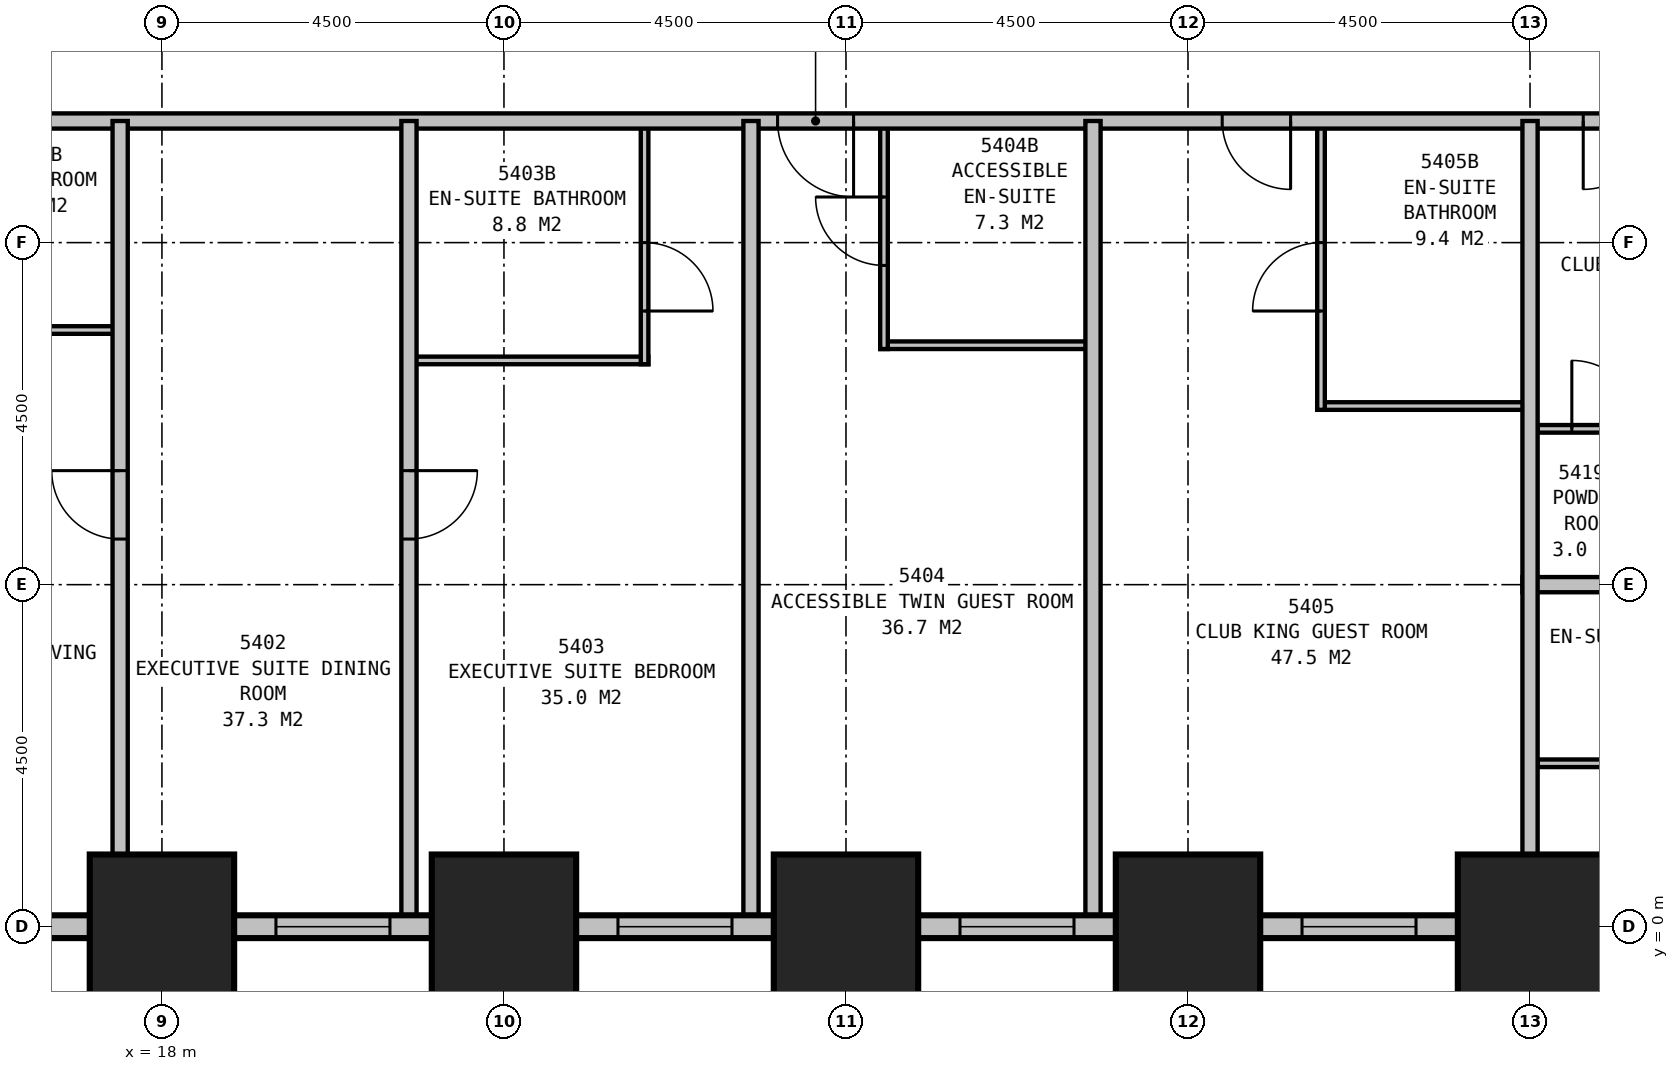
"""IFC4 building model, lengths in metres.
Left out: names, types, materials, properties, quantities, classifications, styles, units other than length and angle.
Written with IfcOpenShell. Run it as: python <this file> out.ifc"""

import sys

from ifc_helpers import new_model, si_unit, direction, frame, frame_2d, origin, origin_2d, place, context, subcontext, project, spatial, rectangle, extrude, element, fill, save


model = new_model("IFC4")
c1 = context("Model", 3, precision=1e-05, world=origin(), true_north=direction((0.0, 1.0)))
c2 = subcontext(c1, "Body", "Model", "MODEL_VIEW")
j1 = project(units=[si_unit("LENGTHUNIT", "METRE"), si_unit("PLANEANGLEUNIT", "RADIAN")], contexts=[c1])
p1 = place(None, origin())
s1 = spatial("IfcSite", under=j1, at=p1, CompositionType="ELEMENT")
p2 = place(p1, origin())
s2 = spatial("IfcBuilding", under=s1, at=p2, CompositionType="ELEMENT")
p3 = place(p2, frame((0.0, 0.0, 207.9)))
s3 = spatial("IfcBuildingStorey", under=s2, at=p3, CompositionType="ELEMENT", Elevation=207.9)
for number, where, z_axis, x_axis in (
    (1, (18.0, 0.0, 0.0), (0.0, 0.0, 1.0), (1.0, 0.0, 0.0)),
    (2, (22.5, 0.0, 0.0), (0.0, 0.0, 1.0), (1.0, 0.0, 0.0)),
    (3, (27.0, 0.0, 0.0), (0.0, 0.0, 1.0), (1.0, 0.0, 0.0)),
    (4, (31.5, 0.0, 0.0), (0.0, 0.0, 1.0), (1.0, 0.0, 0.0)),
    (5, (36.0, 0.0, 0.0), (0.0, 0.0, 1.0), (1.0, 0.0, 0.0)),
):
    element("IfcColumn", number, at=place(p3, frame(where, z_axis=z_axis, x_axis=x_axis)), inside=s3, PredefinedType="COLUMN", context=c2, shape_type="SweptSolid", body=[
        extrude(rectangle(XDim=1.9, YDim=1.9, at=origin_2d()), origin(), (0.0, 0.0, 1.0), 3.5),
    ])
p4 = place(p3, frame((8.85, 0.0, 0.0), z_axis=(0.0, 0.0, 1.0), x_axis=(1.0, 0.0, 0.0)))
e6 = element("IfcWall", 6, at=p4, inside=s3, PredefinedType="STANDARD", context=c2, shape_type="SweptSolid", body=[
    extrude(rectangle(XDim=36.3, YDim=0.3, at=frame_2d((18.15, 0.0))), origin(), (0.0, 0.0, 1.0), 1.9),
])
p5 = place(p4, frame((1.65, 0.0, 0.5)))
e7 = element("IfcOpeningElement", 7, at=p5, cuts=e6, PredefinedType="OPENING", context=c2, shape_type="SweptSolid", body=[
    extrude(rectangle(XDim=1.5, YDim=1.2, at=frame_2d((0.75, 0.6))), frame((0.0, 0.16, 0.0), z_axis=(0.0, -1.0, 0.0), x_axis=(1.0, 0.0, 0.0)), (0.0, 0.0, 1.0), 0.32),
])
p6 = place(p4, frame((6.15, 0.0, 0.5)))
e8 = element("IfcOpeningElement", 8, at=p6, cuts=e6, PredefinedType="OPENING", context=c2, shape_type="SweptSolid", body=[
    extrude(rectangle(XDim=1.5, YDim=1.2, at=frame_2d((0.75, 0.6))), frame((0.0, 0.16, 0.0), z_axis=(0.0, -1.0, 0.0), x_axis=(1.0, 0.0, 0.0)), (0.0, 0.0, 1.0), 0.32),
])
p7 = place(p4, frame((10.65, 0.0, 0.5)))
e9 = element("IfcOpeningElement", 9, at=p7, cuts=e6, PredefinedType="OPENING", context=c2, shape_type="SweptSolid", body=[
    extrude(rectangle(XDim=1.5, YDim=1.2, at=frame_2d((0.75, 0.6))), frame((0.0, 0.16, 0.0), z_axis=(0.0, -1.0, 0.0), x_axis=(1.0, 0.0, 0.0)), (0.0, 0.0, 1.0), 0.32),
])
p8 = place(p4, frame((15.15, 0.0, 0.5)))
e10 = element("IfcOpeningElement", 10, at=p8, cuts=e6, PredefinedType="OPENING", context=c2, shape_type="SweptSolid", body=[
    extrude(rectangle(XDim=1.5, YDim=1.2, at=frame_2d((0.75, 0.6))), frame((0.0, 0.16, 0.0), z_axis=(0.0, -1.0, 0.0), x_axis=(1.0, 0.0, 0.0)), (0.0, 0.0, 1.0), 0.32),
])
p9 = place(p4, frame((19.65, 0.0, 0.5)))
e11 = element("IfcOpeningElement", 11, at=p9, cuts=e6, PredefinedType="OPENING", context=c2, shape_type="SweptSolid", body=[
    extrude(rectangle(XDim=1.5, YDim=1.2, at=frame_2d((0.75, 0.6))), frame((0.0, 0.16, 0.0), z_axis=(0.0, -1.0, 0.0), x_axis=(1.0, 0.0, 0.0)), (0.0, 0.0, 1.0), 0.32),
])
p10 = place(p4, frame((24.15, 0.0, 0.5)))
e12 = element("IfcOpeningElement", 12, at=p10, cuts=e6, PredefinedType="OPENING", context=c2, shape_type="SweptSolid", body=[
    extrude(rectangle(XDim=1.5, YDim=1.2, at=frame_2d((0.75, 0.6))), frame((0.0, 0.16, 0.0), z_axis=(0.0, -1.0, 0.0), x_axis=(1.0, 0.0, 0.0)), (0.0, 0.0, 1.0), 0.32),
])
p11 = place(p4, frame((28.65, 0.0, 0.5)))
e13 = element("IfcOpeningElement", 13, at=p11, cuts=e6, PredefinedType="OPENING", context=c2, shape_type="SweptSolid", body=[
    extrude(rectangle(XDim=1.5, YDim=1.2, at=frame_2d((0.75, 0.6))), frame((0.0, 0.16, 0.0), z_axis=(0.0, -1.0, 0.0), x_axis=(1.0, 0.0, 0.0)), (0.0, 0.0, 1.0), 0.32),
])
p12 = place(p4, frame((33.15, 0.0, 0.5)))
e14 = element("IfcOpeningElement", 14, at=p12, cuts=e6, PredefinedType="OPENING", context=c2, shape_type="SweptSolid", body=[
    extrude(rectangle(XDim=1.5, YDim=1.2, at=frame_2d((0.75, 0.6))), frame((0.0, 0.16, 0.0), z_axis=(0.0, -1.0, 0.0), x_axis=(1.0, 0.0, 0.0)), (0.0, 0.0, 1.0), 0.32),
])
p13 = place(p3, frame((11.2, 10.6, 0.0), z_axis=(0.0, 0.0, 1.0), x_axis=(1.0, 0.0, 0.0)))
e15 = element("IfcWall", 15, at=p13, inside=s3, PredefinedType="PARTITIONING", context=c2, shape_type="SweptSolid", body=[
    extrude(rectangle(XDim=27.1, YDim=0.2, at=frame_2d((13.55, 0.0))), origin(), (0.0, 0.0, 1.0), 3.25),
])
p14 = place(p13, frame((3.5, 0.0, 0.0), z_axis=(0.0, 0.0, 1.0), x_axis=(-1.0, 0.0, 0.0)))
e16 = element("IfcOpeningElement", 16, at=p14, cuts=e15, PredefinedType="OPENING", context=c2, shape_type="SweptSolid", body=[
    extrude(rectangle(XDim=0.9, YDim=2.1, at=frame_2d((0.45, 1.05))), frame((0.0, 0.11, 0.0), z_axis=(0.0, -1.0, 0.0), x_axis=(1.0, 0.0, 0.0)), (0.0, 0.0, 1.0), 0.22),
])
p15 = place(p13, frame((15.9, 0.0, 0.0), z_axis=(0.0, 0.0, 1.0), x_axis=(-1.0, 0.0, 0.0)))
e17 = element("IfcOpeningElement", 17, at=p15, cuts=e15, PredefinedType="OPENING", context=c2, shape_type="SweptSolid", body=[
    extrude(rectangle(XDim=1.0, YDim=2.1, at=frame_2d((0.5, 1.05))), frame((0.0, 0.11, 0.0), z_axis=(0.0, -1.0, 0.0), x_axis=(1.0, 0.0, 0.0)), (0.0, 0.0, 1.0), 0.22),
])
p16 = place(p13, frame((21.65, 0.0, 0.0), z_axis=(0.0, 0.0, 1.0), x_axis=(-1.0, 0.0, 0.0)))
e18 = element("IfcOpeningElement", 18, at=p16, cuts=e15, PredefinedType="OPENING", context=c2, shape_type="SweptSolid", body=[
    extrude(rectangle(XDim=0.9, YDim=2.1, at=frame_2d((0.45, 1.05))), frame((0.0, 0.11, 0.0), z_axis=(0.0, -1.0, 0.0), x_axis=(1.0, 0.0, 0.0)), (0.0, 0.0, 1.0), 0.22),
])
p17 = place(p13, frame((1.6, 0.0, 0.0), z_axis=(0.0, 0.0, 1.0), x_axis=(-1.0, 0.0, 0.0)))
e19 = element("IfcOpeningElement", 19, at=p17, cuts=e15, PredefinedType="OPENING", context=c2, shape_type="SweptSolid", body=[
    extrude(rectangle(XDim=0.9, YDim=2.1, at=frame_2d((0.45, 1.05))), frame((0.0, 0.11, 0.0), z_axis=(0.0, -1.0, 0.0), x_axis=(1.0, 0.0, 0.0)), (0.0, 0.0, 1.0), 0.22),
])
p18 = place(p13, frame((26.4, 0.0, 0.0), z_axis=(0.0, 0.0, 1.0), x_axis=(-1.0, 0.0, 0.0)))
e20 = element("IfcOpeningElement", 20, at=p18, cuts=e15, PredefinedType="OPENING", context=c2, shape_type="SweptSolid", body=[
    extrude(rectangle(XDim=0.9, YDim=2.1, at=frame_2d((0.45, 1.05))), frame((0.0, 0.11, 0.0), z_axis=(0.0, -1.0, 0.0), x_axis=(1.0, 0.0, 0.0)), (0.0, 0.0, 1.0), 0.22),
])
p19 = place(p3, frame((17.45, 10.6, 0.0), z_axis=(0.0, 0.0, 1.0), x_axis=(0.0, -1.0, 0.0)))
e21 = element("IfcWall", 21, at=p19, inside=s3, PredefinedType="PARTITIONING", context=c2, shape_type="SweptSolid", body=[
    extrude(rectangle(XDim=10.6, YDim=0.2, at=frame_2d((5.3, 0.0))), origin(), (0.0, 0.0, 1.0), 2.2),
])
p20 = place(p19, frame((5.5, 0.0, 0.0), z_axis=(0.0, 0.0, 1.0), x_axis=(-1.0, 0.0, 0.0)))
e22 = element("IfcOpeningElement", 22, at=p20, cuts=e21, PredefinedType="OPENING", context=c2, shape_type="SweptSolid", body=[
    extrude(rectangle(XDim=0.9, YDim=2.1, at=frame_2d((0.45, 1.05))), frame((0.0, 0.11, 0.0), z_axis=(0.0, -1.0, 0.0), x_axis=(1.0, 0.0, 0.0)), (0.0, 0.0, 1.0), 0.22),
])
p21 = place(p3, frame((21.25, 10.6, 0.0), z_axis=(0.0, 0.0, 1.0), x_axis=(0.0, -1.0, 0.0)))
e23 = element("IfcWall", 23, at=p21, inside=s3, PredefinedType="PARTITIONING", context=c2, shape_type="SweptSolid", body=[
    extrude(rectangle(XDim=10.6, YDim=0.2, at=frame_2d((5.3, 0.0))), origin(), (0.0, 0.0, 1.0), 3.25),
])
p22 = place(p21, frame((4.6, 0.0, 0.0)))
e24 = element("IfcOpeningElement", 24, at=p22, cuts=e23, PredefinedType="OPENING", context=c2, shape_type="SweptSolid", body=[
    extrude(rectangle(XDim=0.9, YDim=2.1, at=frame_2d((0.45, 1.05))), frame((0.0, 0.11, 0.0), z_axis=(0.0, -1.0, 0.0), x_axis=(1.0, 0.0, 0.0)), (0.0, 0.0, 1.0), 0.22),
])
for number, where, z_axis, x_axis in (
    (25, (25.75, 10.6, 0.0), (0.0, 0.0, 1.0), (0.0, -1.0, 0.0)),
    (26, (30.25, 10.6, 0.0), (0.0, 0.0, 1.0), (0.0, -1.0, 0.0)),
):
    element("IfcWall", number, at=place(p3, frame(where, z_axis=z_axis, x_axis=x_axis)), inside=s3, PredefinedType="PARTITIONING", context=c2, shape_type="SweptSolid", body=[
        extrude(rectangle(XDim=10.6, YDim=0.2, at=frame_2d((5.3, 0.0))), origin(), (0.0, 0.0, 1.0), 3.25),
    ])
p23 = place(p3, frame((15.05, 7.85, 0.0), z_axis=(0.0, 0.0, 1.0), x_axis=(1.0, 0.0, 0.0)))
e27 = element("IfcWall", 27, at=p23, inside=s3, PredefinedType="PLUMBINGWALL", context=c2, shape_type="SweptSolid", body=[
    extrude(rectangle(XDim=2.4, YDim=0.1, at=frame_2d((1.2, 0.0))), origin(), (0.0, 0.0, 1.0), 3.25),
])
p24 = place(p3, frame((21.25, 7.45, 0.0), z_axis=(0.0, 0.0, 1.0), x_axis=(1.0, 0.0, 0.0)))
e28 = element("IfcWall", 28, at=p24, inside=s3, PredefinedType="PLUMBINGWALL", context=c2, shape_type="SweptSolid", body=[
    extrude(rectangle(XDim=3.15, YDim=0.1, at=frame_2d((1.575, 0.0))), origin(), (0.0, 0.0, 1.0), 3.25),
])
p25 = place(p3, frame((24.35, 10.6, 0.0), z_axis=(0.0, 0.0, 1.0), x_axis=(0.0, -1.0, 0.0)))
e29 = element("IfcWall", 29, at=p25, inside=s3, PredefinedType="PLUMBINGWALL", context=c2, shape_type="SweptSolid", body=[
    extrude(rectangle(XDim=3.2, YDim=0.1, at=frame_2d((1.6, 0.0))), origin(), (0.0, 0.0, 1.0), 3.25),
])
p26 = place(p25, frame((1.6, 0.0, 0.0)))
e30 = element("IfcOpeningElement", 30, at=p26, cuts=e29, PredefinedType="OPENING", context=c2, shape_type="SweptSolid", body=[
    extrude(rectangle(XDim=0.9, YDim=2.1, at=frame_2d((0.45, 1.05))), frame((0.0, 0.06, 0.0), z_axis=(0.0, -1.0, 0.0), x_axis=(1.0, 0.0, 0.0)), (0.0, 0.0, 1.0), 0.12),
])
p27 = place(p3, frame((27.45, 7.65, 0.0), z_axis=(0.0, 0.0, 1.0), x_axis=(1.0, 0.0, 0.0)))
e31 = element("IfcWall", 31, at=p27, inside=s3, PredefinedType="PLUMBINGWALL", context=c2, shape_type="SweptSolid", body=[
    extrude(rectangle(XDim=2.8, YDim=0.1, at=frame_2d((1.4, 0.0))), origin(), (0.0, 0.0, 1.0), 3.25),
])
p28 = place(p3, frame((27.5, 10.6, 0.0), z_axis=(0.0, 0.0, 1.0), x_axis=(0.0, -1.0, 0.0)))
e32 = element("IfcWall", 32, at=p28, inside=s3, PredefinedType="PLUMBINGWALL", context=c2, shape_type="SweptSolid", body=[
    extrude(rectangle(XDim=3.0, YDim=0.1, at=frame_2d((1.5, 0.0))), origin(), (0.0, 0.0, 1.0), 2.2),
])
p29 = place(p28, frame((1.9, 0.0, 0.0), z_axis=(0.0, 0.0, 1.0), x_axis=(-1.0, 0.0, 0.0)))
e33 = element("IfcOpeningElement", 33, at=p29, cuts=e32, PredefinedType="OPENING", context=c2, shape_type="SweptSolid", body=[
    extrude(rectangle(XDim=0.9, YDim=2.1, at=frame_2d((0.45, 1.05))), frame((0.0, 0.06, 0.0), z_axis=(0.0, -1.0, 0.0), x_axis=(1.0, 0.0, 0.0)), (0.0, 0.0, 1.0), 0.12),
])
p30 = place(p3, frame((33.2, 6.85, 0.0), z_axis=(0.0, 0.0, 1.0), x_axis=(1.0, 0.0, 0.0)))
e34 = element("IfcWall", 34, at=p30, inside=s3, PredefinedType="PLUMBINGWALL", context=c2, shape_type="SweptSolid", body=[
    extrude(rectangle(XDim=2.8, YDim=0.1, at=frame_2d((1.4, 0.0))), origin(), (0.0, 0.0, 1.0), 3.25),
])
p31 = place(p3, frame((33.25, 10.6, 0.0), z_axis=(0.0, 0.0, 1.0), x_axis=(0.0, -1.0, 0.0)))
e35 = element("IfcWall", 35, at=p31, inside=s3, PredefinedType="PLUMBINGWALL", context=c2, shape_type="SweptSolid", body=[
    extrude(rectangle(XDim=3.8, YDim=0.1, at=frame_2d((1.9, 0.0))), origin(), (0.0, 0.0, 1.0), 3.25),
])
p32 = place(p31, frame((2.5, 0.0, 0.0), z_axis=(0.0, 0.0, 1.0), x_axis=(-1.0, 0.0, 0.0)))
e36 = element("IfcOpeningElement", 36, at=p32, cuts=e35, PredefinedType="OPENING", context=c2, shape_type="SweptSolid", body=[
    extrude(rectangle(XDim=0.9, YDim=2.1, at=frame_2d((0.45, 1.05))), frame((0.0, 0.06, 0.0), z_axis=(0.0, -1.0, 0.0), x_axis=(1.0, 0.0, 0.0)), (0.0, 0.0, 1.0), 0.12),
])
p33 = place(p3, frame((36.0, 10.6, 0.0), z_axis=(0.0, 0.0, 1.0), x_axis=(0.0, -1.0, 0.0)))
e37 = element("IfcWall", 37, at=p33, inside=s3, PredefinedType="PARTITIONING", context=c2, shape_type="SweptSolid", body=[
    extrude(rectangle(XDim=10.6, YDim=0.2, at=frame_2d((5.3, 0.0))), origin(), (0.0, 0.0, 1.0), 2.2),
])
p34 = place(p3, frame((35.9, 4.5, 0.0), z_axis=(0.0, 0.0, 1.0), x_axis=(1.0, 0.0, 0.0)))
e38 = element("IfcWall", 38, at=p34, inside=s3, PredefinedType="PARTITIONING", context=c2, shape_type="SweptSolid", body=[
    extrude(rectangle(XDim=9.1, YDim=0.2, at=frame_2d((4.55, 0.0))), origin(), (0.0, 0.0, 1.0), 3.25),
])
p35 = place(p34, frame((7.1, 0.0, 0.0)))
e39 = element("IfcOpeningElement", 39, at=p35, cuts=e38, PredefinedType="OPENING", context=c2, shape_type="SweptSolid", body=[
    extrude(rectangle(XDim=0.9, YDim=2.1, at=frame_2d((0.45, 1.05))), frame((0.0, 0.11, 0.0), z_axis=(0.0, -1.0, 0.0), x_axis=(1.0, 0.0, 0.0)), (0.0, 0.0, 1.0), 0.22),
])
p36 = place(p3, frame((36.1, 6.55, 0.0), z_axis=(0.0, 0.0, 1.0), x_axis=(1.0, 0.0, 0.0)))
e40 = element("IfcWall", 40, at=p36, inside=s3, PredefinedType="PLUMBINGWALL", context=c2, shape_type="SweptSolid", body=[
    extrude(rectangle(XDim=1.8, YDim=0.1, at=frame_2d((0.9, 0.0))), origin(), (0.0, 0.0, 1.0), 3.25),
])
p37 = place(p36, frame((0.45, 0.0, 0.0)))
e41 = element("IfcOpeningElement", 41, at=p37, cuts=e40, PredefinedType="OPENING", context=c2, shape_type="SweptSolid", body=[
    extrude(rectangle(XDim=0.9, YDim=2.1, at=frame_2d((0.45, 1.05))), frame((0.0, 0.06, 0.0), z_axis=(0.0, -1.0, 0.0), x_axis=(1.0, 0.0, 0.0)), (0.0, 0.0, 1.0), 0.12),
])
p38 = place(p3, frame((36.1, 2.15, 0.0), z_axis=(0.0, 0.0, 1.0), x_axis=(1.0, 0.0, 0.0)))
e42 = element("IfcWall", 42, at=p38, inside=s3, PredefinedType="PLUMBINGWALL", context=c2, shape_type="SweptSolid", body=[
    extrude(rectangle(XDim=3.1, YDim=0.1, at=frame_2d((1.55, 0.0))), origin(), (0.0, 0.0, 1.0), 3.25),
])
p39 = place(p38, frame((1.8, 0.0, 0.0), z_axis=(0.0, 0.0, 1.0), x_axis=(-1.0, 0.0, 0.0)))
e43 = element("IfcOpeningElement", 43, at=p39, cuts=e42, PredefinedType="OPENING", context=c2, shape_type="SweptSolid", body=[
    extrude(rectangle(XDim=0.9, YDim=2.1, at=frame_2d((0.45, 1.05))), frame((0.0, 0.06, 0.0), z_axis=(0.0, -1.0, 0.0), x_axis=(1.0, 0.0, 0.0)), (0.0, 0.0, 1.0), 0.12),
])
p40 = place(p7, origin())
e44 = element("IfcWindow", 44, at=p40, inside=s3, PartitioningType="SINGLE_PANEL", PredefinedType="WINDOW", context=c2, shape_type="SweptSolid", body=[
    extrude(rectangle(XDim=1.5, YDim=1.2, at=frame_2d((0.75, 0.6))), frame((0.0, 0.03, 0.0), z_axis=(0.0, -1.0, 0.0), x_axis=(1.0, 0.0, 0.0)), (0.0, 0.0, 1.0), 0.06),
])
fill(e9, e44)
p41 = place(p8, origin())
e45 = element("IfcWindow", 45, at=p41, inside=s3, PartitioningType="SINGLE_PANEL", PredefinedType="WINDOW", context=c2, shape_type="SweptSolid", body=[
    extrude(rectangle(XDim=1.5, YDim=1.2, at=frame_2d((0.75, 0.6))), frame((0.0, 0.03, 0.0), z_axis=(0.0, -1.0, 0.0), x_axis=(1.0, 0.0, 0.0)), (0.0, 0.0, 1.0), 0.06),
])
fill(e10, e45)
p42 = place(p9, origin())
e46 = element("IfcWindow", 46, at=p42, inside=s3, PartitioningType="SINGLE_PANEL", PredefinedType="WINDOW", context=c2, shape_type="SweptSolid", body=[
    extrude(rectangle(XDim=1.5, YDim=1.2, at=frame_2d((0.75, 0.6))), frame((0.0, 0.03, 0.0), z_axis=(0.0, -1.0, 0.0), x_axis=(1.0, 0.0, 0.0)), (0.0, 0.0, 1.0), 0.06),
])
fill(e11, e46)
p43 = place(p10, origin())
e47 = element("IfcWindow", 47, at=p43, inside=s3, PartitioningType="SINGLE_PANEL", PredefinedType="WINDOW", context=c2, shape_type="SweptSolid", body=[
    extrude(rectangle(XDim=1.5, YDim=1.2, at=frame_2d((0.75, 0.6))), frame((0.0, 0.03, 0.0), z_axis=(0.0, -1.0, 0.0), x_axis=(1.0, 0.0, 0.0)), (0.0, 0.0, 1.0), 0.06),
])
fill(e12, e47)
p44 = place(p15, origin())
e48 = element("IfcDoor", 48, at=p44, inside=s3, OperationType="SINGLE_SWING_LEFT", PredefinedType="DOOR", context=c2, shape_type="SweptSolid", body=[
    extrude(rectangle(XDim=1.0, YDim=2.1, at=frame_2d((0.5, 1.05))), frame((0.0, 0.025, 0.0), z_axis=(0.0, -1.0, 0.0), x_axis=(1.0, 0.0, 0.0)), (0.0, 0.0, 1.0), 0.05),
])
fill(e17, e48)
p45 = place(p16, origin())
e49 = element("IfcDoor", 49, at=p45, inside=s3, OperationType="SINGLE_SWING_LEFT", PredefinedType="DOOR", context=c2, shape_type="SweptSolid", body=[
    extrude(rectangle(XDim=0.9, YDim=2.1, at=frame_2d((0.45, 1.05))), frame((0.0, 0.025, 0.0), z_axis=(0.0, -1.0, 0.0), x_axis=(1.0, 0.0, 0.0)), (0.0, 0.0, 1.0), 0.05),
])
fill(e18, e49)
p46 = place(p18, origin())
e50 = element("IfcDoor", 50, at=p46, inside=s3, OperationType="SINGLE_SWING_RIGHT", PredefinedType="DOOR", context=c2, shape_type="SweptSolid", body=[
    extrude(rectangle(XDim=0.9, YDim=2.1, at=frame_2d((0.45, 1.05))), frame((0.0, 0.025, 0.0), z_axis=(0.0, -1.0, 0.0), x_axis=(1.0, 0.0, 0.0)), (0.0, 0.0, 1.0), 0.05),
])
fill(e20, e50)
p47 = place(p20, origin())
e51 = element("IfcDoor", 51, at=p47, inside=s3, OperationType="SINGLE_SWING_RIGHT", PredefinedType="DOOR", context=c2, shape_type="SweptSolid", body=[
    extrude(rectangle(XDim=0.9, YDim=2.1, at=frame_2d((0.45, 1.05))), frame((0.0, 0.025, 0.0), z_axis=(0.0, -1.0, 0.0), x_axis=(1.0, 0.0, 0.0)), (0.0, 0.0, 1.0), 0.05),
])
fill(e22, e51)
p48 = place(p22, origin())
e52 = element("IfcDoor", 52, at=p48, inside=s3, OperationType="SINGLE_SWING_LEFT", PredefinedType="DOOR", context=c2, shape_type="SweptSolid", body=[
    extrude(rectangle(XDim=0.9, YDim=2.1, at=frame_2d((0.45, 1.05))), frame((0.0, 0.025, 0.0), z_axis=(0.0, -1.0, 0.0), x_axis=(1.0, 0.0, 0.0)), (0.0, 0.0, 1.0), 0.05),
])
fill(e24, e52)
p49 = place(p26, origin())
e53 = element("IfcDoor", 53, at=p49, inside=s3, OperationType="SINGLE_SWING_RIGHT", PredefinedType="DOOR", context=c2, shape_type="SweptSolid", body=[
    extrude(rectangle(XDim=0.9, YDim=2.1, at=frame_2d((0.45, 1.05))), frame((0.0, 0.025, 0.0), z_axis=(0.0, -1.0, 0.0), x_axis=(1.0, 0.0, 0.0)), (0.0, 0.0, 1.0), 0.05),
])
fill(e30, e53)
p50 = place(p29, origin())
e54 = element("IfcDoor", 54, at=p50, inside=s3, OperationType="SINGLE_SWING_RIGHT", PredefinedType="DOOR", context=c2, shape_type="SweptSolid", body=[
    extrude(rectangle(XDim=0.9, YDim=2.1, at=frame_2d((0.45, 1.05))), frame((0.0, 0.025, 0.0), z_axis=(0.0, -1.0, 0.0), x_axis=(1.0, 0.0, 0.0)), (0.0, 0.0, 1.0), 0.05),
])
fill(e33, e54)
p51 = place(p32, origin())
e55 = element("IfcDoor", 55, at=p51, inside=s3, OperationType="SINGLE_SWING_LEFT", PredefinedType="DOOR", context=c2, shape_type="SweptSolid", body=[
    extrude(rectangle(XDim=0.9, YDim=2.1, at=frame_2d((0.45, 1.05))), frame((0.0, 0.025, 0.0), z_axis=(0.0, -1.0, 0.0), x_axis=(1.0, 0.0, 0.0)), (0.0, 0.0, 1.0), 0.05),
])
fill(e36, e55)
p52 = place(p37, origin())
e56 = element("IfcDoor", 56, at=p52, inside=s3, OperationType="SINGLE_SWING_LEFT", PredefinedType="DOOR", context=c2, shape_type="SweptSolid", body=[
    extrude(rectangle(XDim=0.9, YDim=2.1, at=frame_2d((0.45, 1.05))), frame((0.0, 0.025, 0.0), z_axis=(0.0, -1.0, 0.0), x_axis=(1.0, 0.0, 0.0)), (0.0, 0.0, 1.0), 0.05),
])
fill(e41, e56)
save(model, sys.argv[1])
